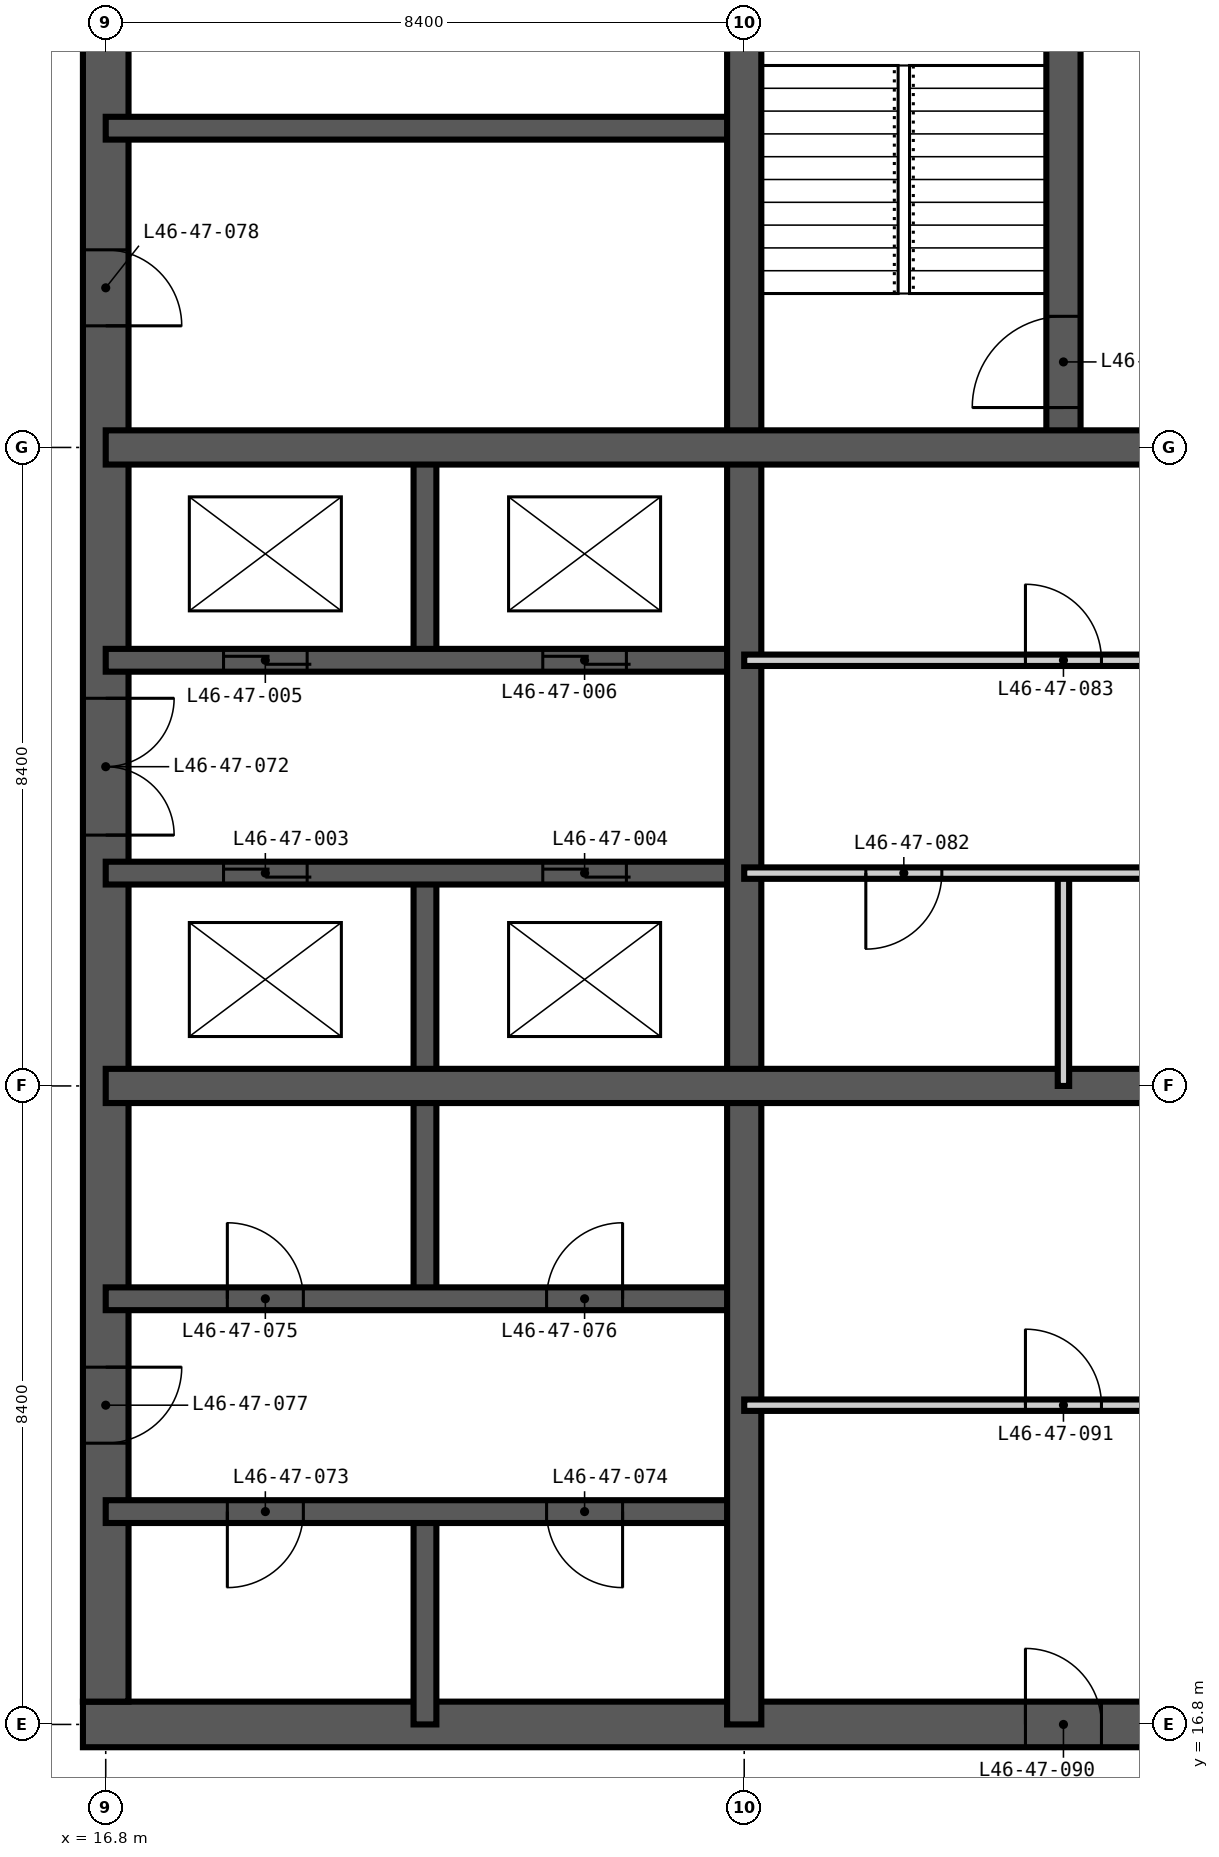
"""IFC4 building model, lengths in metres.
Left out: names, types, materials, properties, quantities, classifications, styles, units other than length and angle.
Written with IfcOpenShell. Run it as: python <this file> out.ifc"""

import sys

from ifc_helpers import new_model, si_unit, direction, frame, frame_2d, origin, place, context, subcontext, project, spatial, rectangle, extrude, element, fill, save


model = new_model("IFC4")
c1 = context("Model", 3, precision=1e-05, world=origin(), true_north=direction((0.0, 1.0)))
c2 = subcontext(c1, "Body", "Model", "MODEL_VIEW")
j1 = project(units=[si_unit("LENGTHUNIT", "METRE"), si_unit("PLANEANGLEUNIT", "RADIAN")], contexts=[c1])
p1 = place(None, origin())
s1 = spatial("IfcSite", under=j1, at=p1, CompositionType="ELEMENT")
p2 = place(p1, origin())
s2 = spatial("IfcBuilding", under=s1, at=p2, CompositionType="ELEMENT")
p3 = place(p2, frame((0.0, 0.0, 180.6)))
s3 = spatial("IfcBuildingStorey", under=s2, at=p3, CompositionType="ELEMENT", Elevation=180.6)
p4 = place(p3, frame((16.5, 16.8, -0.35), z_axis=(0.0, 0.0, 1.0), x_axis=(1.0, 0.0, 0.0)))
e1 = element("IfcWall", 1, at=p4, inside=s3, PredefinedType="SHEAR", context=c2, shape_type="SweptSolid", body=[
    extrude(rectangle(XDim=25.8, YDim=0.6, at=frame_2d((12.9, 0.0))), origin(), (0.0, 0.0, 1.0), 3.6),
])
p5 = place(p4, frame((12.4, 0.0, 0.35)))
e2 = element("IfcOpeningElement", 2, at=p5, cuts=e1, PredefinedType="OPENING", context=c2, shape_type="SweptSolid", body=[
    extrude(rectangle(XDim=1.0, YDim=2.1, at=frame_2d((0.5, 1.05))), frame((0.0, 0.31, 0.0), z_axis=(0.0, -1.0, 0.0), x_axis=(1.0, 0.0, 0.0)), (0.0, 0.0, 1.0), 0.62),
])
p6 = place(p4, frame((18.7, 0.0, 0.35)))
e3 = element("IfcOpeningElement", 3, at=p6, cuts=e1, PredefinedType="OPENING", context=c2, shape_type="SweptSolid", body=[
    extrude(rectangle(XDim=1.0, YDim=2.1, at=frame_2d((0.5, 1.05))), frame((0.0, 0.31, 0.0), z_axis=(0.0, -1.0, 0.0), x_axis=(1.0, 0.0, 0.0)), (0.0, 0.0, 1.0), 0.62),
])
p7 = place(p3, frame((16.8, 41.7, -0.35), z_axis=(0.0, 0.0, 1.0), x_axis=(0.0, -1.0, 0.0)))
e4 = element("IfcWall", 4, at=p7, inside=s3, PredefinedType="SHEAR", context=c2, shape_type="SweptSolid", body=[
    extrude(rectangle(XDim=24.6, YDim=0.6, at=frame_2d((12.3, 0.0))), origin(), (0.0, 0.0, 1.0), 3.6),
])
p8 = place(p7, frame((11.4, 0.0, 0.35)))
e5 = element("IfcOpeningElement", 5, at=p8, cuts=e4, PredefinedType="OPENING", context=c2, shape_type="SweptSolid", body=[
    extrude(rectangle(XDim=1.8, YDim=2.2, at=frame_2d((0.9, 1.1))), frame((0.0, 0.31, 0.0), z_axis=(0.0, -1.0, 0.0), x_axis=(1.0, 0.0, 0.0)), (0.0, 0.0, 1.0), 0.62),
])
p9 = place(p7, frame((20.2, 0.0, 0.35)))
e6 = element("IfcOpeningElement", 6, at=p9, cuts=e4, PredefinedType="OPENING", context=c2, shape_type="SweptSolid", body=[
    extrude(rectangle(XDim=1.0, YDim=2.1, at=frame_2d((0.5, 1.05))), frame((0.0, 0.31, 0.0), z_axis=(0.0, -1.0, 0.0), x_axis=(1.0, 0.0, 0.0)), (0.0, 0.0, 1.0), 0.62),
])
p10 = place(p7, frame((5.5, 0.0, 0.35)))
e7 = element("IfcOpeningElement", 7, at=p10, cuts=e4, PredefinedType="OPENING", context=c2, shape_type="SweptSolid", body=[
    extrude(rectangle(XDim=1.0, YDim=2.1, at=frame_2d((0.5, 1.05))), frame((0.0, 0.31, 0.0), z_axis=(0.0, -1.0, 0.0), x_axis=(1.0, 0.0, 0.0)), (0.0, 0.0, 1.0), 0.62),
])
p11 = place(p3, frame((21.0, 16.8, -0.35), z_axis=(0.0, 0.0, 1.0), x_axis=(0.0, 1.0, 0.0)))
e8 = element("IfcWall", 8, at=p11, inside=s3, PredefinedType="SHEAR", context=c2, shape_type="SweptSolid", body=[
    extrude(rectangle(XDim=2.8, YDim=0.3, at=frame_2d((1.4, 0.0))), origin(), (0.0, 0.0, 1.0), 3.6),
])
p12 = place(p3, frame((21.0, 22.4, -0.35), z_axis=(0.0, 0.0, 1.0), x_axis=(0.0, 1.0, 0.0)))
e9 = element("IfcWall", 9, at=p12, inside=s3, PredefinedType="SHEAR", context=c2, shape_type="SweptSolid", body=[
    extrude(rectangle(XDim=5.6, YDim=0.3, at=frame_2d((2.8, 0.0))), origin(), (0.0, 0.0, 1.0), 3.6),
])
p13 = place(p3, frame((21.0, 30.8, -0.35), z_axis=(0.0, 0.0, 1.0), x_axis=(0.0, 1.0, 0.0)))
e10 = element("IfcWall", 10, at=p13, inside=s3, PredefinedType="SHEAR", context=c2, shape_type="SweptSolid", body=[
    extrude(rectangle(XDim=2.8, YDim=0.3, at=frame_2d((1.4, 0.0))), origin(), (0.0, 0.0, 1.0), 3.6),
])
p14 = place(p3, frame((16.8, 19.6, -0.35), z_axis=(0.0, 0.0, 1.0), x_axis=(1.0, 0.0, 0.0)))
e11 = element("IfcWall", 11, at=p14, inside=s3, PredefinedType="SHEAR", context=c2, shape_type="SweptSolid", body=[
    extrude(rectangle(XDim=8.4, YDim=0.3, at=frame_2d((4.2, 0.0))), origin(), (0.0, 0.0, 1.0), 3.6),
])
p15 = place(p14, frame((1.6, 0.0, 0.35)))
e12 = element("IfcOpeningElement", 12, at=p15, cuts=e11, PredefinedType="OPENING", context=c2, shape_type="SweptSolid", body=[
    extrude(rectangle(XDim=1.0, YDim=2.1, at=frame_2d((0.5, 1.05))), frame((0.0, 0.16, 0.0), z_axis=(0.0, -1.0, 0.0), x_axis=(1.0, 0.0, 0.0)), (0.0, 0.0, 1.0), 0.32),
])
p16 = place(p14, frame((5.8, 0.0, 0.35)))
e13 = element("IfcOpeningElement", 13, at=p16, cuts=e11, PredefinedType="OPENING", context=c2, shape_type="SweptSolid", body=[
    extrude(rectangle(XDim=1.0, YDim=2.1, at=frame_2d((0.5, 1.05))), frame((0.0, 0.16, 0.0), z_axis=(0.0, -1.0, 0.0), x_axis=(1.0, 0.0, 0.0)), (0.0, 0.0, 1.0), 0.32),
])
p17 = place(p3, frame((16.8, 22.4, -0.35), z_axis=(0.0, 0.0, 1.0), x_axis=(1.0, 0.0, 0.0)))
e14 = element("IfcWall", 14, at=p17, inside=s3, PredefinedType="SHEAR", context=c2, shape_type="SweptSolid", body=[
    extrude(rectangle(XDim=8.4, YDim=0.3, at=frame_2d((4.2, 0.0))), origin(), (0.0, 0.0, 1.0), 3.6),
])
p18 = place(p17, frame((1.6, 0.0, 0.35)))
e15 = element("IfcOpeningElement", 15, at=p18, cuts=e14, PredefinedType="OPENING", context=c2, shape_type="SweptSolid", body=[
    extrude(rectangle(XDim=1.0, YDim=2.1, at=frame_2d((0.5, 1.05))), frame((0.0, 0.16, 0.0), z_axis=(0.0, -1.0, 0.0), x_axis=(1.0, 0.0, 0.0)), (0.0, 0.0, 1.0), 0.32),
])
p19 = place(p17, frame((5.8, 0.0, 0.35)))
e16 = element("IfcOpeningElement", 16, at=p19, cuts=e14, PredefinedType="OPENING", context=c2, shape_type="SweptSolid", body=[
    extrude(rectangle(XDim=1.0, YDim=2.1, at=frame_2d((0.5, 1.05))), frame((0.0, 0.16, 0.0), z_axis=(0.0, -1.0, 0.0), x_axis=(1.0, 0.0, 0.0)), (0.0, 0.0, 1.0), 0.32),
])
p20 = place(p3, frame((16.8, 28.0, -0.35), z_axis=(0.0, 0.0, 1.0), x_axis=(1.0, 0.0, 0.0)))
e17 = element("IfcWall", 17, at=p20, inside=s3, PredefinedType="SHEAR", context=c2, shape_type="SweptSolid", body=[
    extrude(rectangle(XDim=8.4, YDim=0.3, at=frame_2d((4.2, 0.0))), origin(), (0.0, 0.0, 1.0), 3.6),
])
p21 = place(p20, frame((1.55, 0.0, 0.35)))
e18 = element("IfcOpeningElement", 18, at=p21, cuts=e17, PredefinedType="OPENING", context=c2, shape_type="SweptSolid", body=[
    extrude(rectangle(XDim=1.1, YDim=2.2, at=frame_2d((0.55, 1.1))), frame((0.0, 0.16, 0.0), z_axis=(0.0, -1.0, 0.0), x_axis=(1.0, 0.0, 0.0)), (0.0, 0.0, 1.0), 0.32),
])
p22 = place(p20, frame((5.75, 0.0, 0.35)))
e19 = element("IfcOpeningElement", 19, at=p22, cuts=e17, PredefinedType="OPENING", context=c2, shape_type="SweptSolid", body=[
    extrude(rectangle(XDim=1.1, YDim=2.2, at=frame_2d((0.55, 1.1))), frame((0.0, 0.16, 0.0), z_axis=(0.0, -1.0, 0.0), x_axis=(1.0, 0.0, 0.0)), (0.0, 0.0, 1.0), 0.32),
])
p23 = place(p3, frame((16.8, 30.8, -0.35), z_axis=(0.0, 0.0, 1.0), x_axis=(1.0, 0.0, 0.0)))
e20 = element("IfcWall", 20, at=p23, inside=s3, PredefinedType="SHEAR", context=c2, shape_type="SweptSolid", body=[
    extrude(rectangle(XDim=8.4, YDim=0.3, at=frame_2d((4.2, 0.0))), origin(), (0.0, 0.0, 1.0), 3.6),
])
p24 = place(p23, frame((1.55, 0.0, 0.35)))
e21 = element("IfcOpeningElement", 21, at=p24, cuts=e20, PredefinedType="OPENING", context=c2, shape_type="SweptSolid", body=[
    extrude(rectangle(XDim=1.1, YDim=2.2, at=frame_2d((0.55, 1.1))), frame((0.0, 0.16, 0.0), z_axis=(0.0, -1.0, 0.0), x_axis=(1.0, 0.0, 0.0)), (0.0, 0.0, 1.0), 0.32),
])
p25 = place(p23, frame((5.75, 0.0, 0.35)))
e22 = element("IfcOpeningElement", 22, at=p25, cuts=e20, PredefinedType="OPENING", context=c2, shape_type="SweptSolid", body=[
    extrude(rectangle(XDim=1.1, YDim=2.2, at=frame_2d((0.55, 1.1))), frame((0.0, 0.16, 0.0), z_axis=(0.0, -1.0, 0.0), x_axis=(1.0, 0.0, 0.0)), (0.0, 0.0, 1.0), 0.32),
])
p26 = place(p3, frame((16.8, 37.8, -0.35), z_axis=(0.0, 0.0, 1.0), x_axis=(1.0, 0.0, 0.0)))
e23 = element("IfcWall", 23, at=p26, inside=s3, PredefinedType="SHEAR", context=c2, shape_type="SweptSolid", body=[
    extrude(rectangle(XDim=8.4, YDim=0.3, at=frame_2d((4.2, 0.0))), origin(), (0.0, 0.0, 1.0), 3.6),
])
p27 = place(p3, frame((25.2, 16.8, -0.35), z_axis=(0.0, 0.0, 1.0), x_axis=(0.0, 1.0, 0.0)))
e24 = element("IfcWall", 24, at=p27, inside=s3, PredefinedType="SHEAR", context=c2, shape_type="SweptSolid", body=[
    extrude(rectangle(XDim=25.2, YDim=0.45, at=frame_2d((12.6, 0.0))), origin(), (0.0, 0.0, 1.0), 3.6),
])
p28 = place(p3, frame((29.4, 33.6, -0.35), z_axis=(0.0, 0.0, 1.0), x_axis=(0.0, 1.0, 0.0)))
e25 = element("IfcWall", 25, at=p28, inside=s3, PredefinedType="SHEAR", context=c2, shape_type="SweptSolid", body=[
    extrude(rectangle(XDim=8.4, YDim=0.45, at=frame_2d((4.2, 0.0))), origin(), (0.0, 0.0, 1.0), 3.6),
])
p29 = place(p28, frame((0.525, 0.0, 0.35)))
e26 = element("IfcOpeningElement", 26, at=p29, cuts=e25, PredefinedType="OPENING", context=c2, shape_type="SweptSolid", body=[
    extrude(rectangle(XDim=1.2, YDim=2.2, at=frame_2d((0.6, 1.1))), frame((0.0, 0.235, 0.0), z_axis=(0.0, -1.0, 0.0), x_axis=(1.0, 0.0, 0.0)), (0.0, 0.0, 1.0), 0.47),
])
for number, where, z_axis, x_axis in (
    (27, (16.8, 25.2, -0.35), (0.0, 0.0, 1.0), (1.0, 0.0, 0.0)),
    (28, (16.8, 33.6, -0.35), (0.0, 0.0, 1.0), (1.0, 0.0, 0.0)),
):
    element("IfcWall", number, at=place(p3, frame(where, z_axis=z_axis, x_axis=x_axis)), inside=s3, PredefinedType="SHEAR", context=c2, shape_type="SweptSolid", body=[
        extrude(rectangle(XDim=25.2, YDim=0.45, at=frame_2d((12.6, 0.0))), origin(), (0.0, 0.0, 1.0), 3.6),
    ])
p30 = place(p3, frame((29.4, 25.2, 0.0), z_axis=(0.0, 0.0, 1.0), x_axis=(0.0, 1.0, 0.0)))
e29 = element("IfcWall", 29, at=p30, inside=s3, PredefinedType="PARTITIONING", context=c2, shape_type="SweptSolid", body=[
    extrude(rectangle(XDim=2.8, YDim=0.15, at=frame_2d((1.4, 0.0))), origin(), (0.0, 0.0, 1.0), 3.25),
])
p31 = place(p3, frame((25.2, 21.0, 0.0), z_axis=(0.0, 0.0, 1.0), x_axis=(1.0, 0.0, 0.0)))
e30 = element("IfcWall", 30, at=p31, inside=s3, PredefinedType="PARTITIONING", context=c2, shape_type="SweptSolid", body=[
    extrude(rectangle(XDim=8.4, YDim=0.15, at=frame_2d((4.2, 0.0))), origin(), (0.0, 0.0, 1.0), 3.25),
])
p32 = place(p31, frame((3.7, 0.0, 0.0)))
e31 = element("IfcOpeningElement", 31, at=p32, cuts=e30, PredefinedType="OPENING", context=c2, shape_type="SweptSolid", body=[
    extrude(rectangle(XDim=1.0, YDim=2.1, at=frame_2d((0.5, 1.05))), frame((0.0, 0.085, 0.0), z_axis=(0.0, -1.0, 0.0), x_axis=(1.0, 0.0, 0.0)), (0.0, 0.0, 1.0), 0.17),
])
p33 = place(p3, frame((25.2, 28.0, 0.0), z_axis=(0.0, 0.0, 1.0), x_axis=(1.0, 0.0, 0.0)))
e32 = element("IfcWall", 32, at=p33, inside=s3, PredefinedType="PARTITIONING", context=c2, shape_type="SweptSolid", body=[
    extrude(rectangle(XDim=8.4, YDim=0.15, at=frame_2d((4.2, 0.0))), origin(), (0.0, 0.0, 1.0), 3.25),
])
p34 = place(p33, frame((5.8, 0.0, 0.0)))
e33 = element("IfcOpeningElement", 33, at=p34, cuts=e32, PredefinedType="OPENING", context=c2, shape_type="SweptSolid", body=[
    extrude(rectangle(XDim=1.0, YDim=2.1, at=frame_2d((0.5, 1.05))), frame((0.0, 0.085, 0.0), z_axis=(0.0, -1.0, 0.0), x_axis=(1.0, 0.0, 0.0)), (0.0, 0.0, 1.0), 0.17),
])
p35 = place(p33, frame((1.6, 0.0, 0.0)))
e34 = element("IfcOpeningElement", 34, at=p35, cuts=e32, PredefinedType="OPENING", context=c2, shape_type="SweptSolid", body=[
    extrude(rectangle(XDim=1.0, YDim=2.1, at=frame_2d((0.5, 1.05))), frame((0.0, 0.085, 0.0), z_axis=(0.0, -1.0, 0.0), x_axis=(1.0, 0.0, 0.0)), (0.0, 0.0, 1.0), 0.17),
])
p36 = place(p3, frame((25.2, 30.8, 0.0), z_axis=(0.0, 0.0, 1.0), x_axis=(1.0, 0.0, 0.0)))
e35 = element("IfcWall", 35, at=p36, inside=s3, PredefinedType="PARTITIONING", context=c2, shape_type="SweptSolid", body=[
    extrude(rectangle(XDim=8.4, YDim=0.15, at=frame_2d((4.2, 0.0))), origin(), (0.0, 0.0, 1.0), 3.25),
])
p37 = place(p36, frame((3.7, 0.0, 0.0)))
e36 = element("IfcOpeningElement", 36, at=p37, cuts=e35, PredefinedType="OPENING", context=c2, shape_type="SweptSolid", body=[
    extrude(rectangle(XDim=1.0, YDim=2.1, at=frame_2d((0.5, 1.05))), frame((0.0, 0.085, 0.0), z_axis=(0.0, -1.0, 0.0), x_axis=(1.0, 0.0, 0.0)), (0.0, 0.0, 1.0), 0.17),
])
p38 = place(p29, origin())
e37 = element("IfcDoor", 37, at=p38, inside=s3, OperationType="SINGLE_SWING_LEFT", PredefinedType="DOOR", context=c2, shape_type="SweptSolid", body=[
    extrude(rectangle(XDim=1.2, YDim=2.2, at=frame_2d((0.6, 1.1))), frame((0.0, 0.025, 0.0), z_axis=(0.0, -1.0, 0.0), x_axis=(1.0, 0.0, 0.0)), (0.0, 0.0, 1.0), 0.05),
])
fill(e26, e37)
p39 = place(p21, origin())
e38 = element("IfcDoor", 38, at=p39, inside=s3, OperationType="DOUBLE_DOOR_SLIDING", PredefinedType="DOOR", context=c2, shape_type="SweptSolid", body=[
    extrude(rectangle(XDim=1.1, YDim=2.2, at=frame_2d((0.55, 1.1))), frame((0.0, 0.025, 0.0), z_axis=(0.0, -1.0, 0.0), x_axis=(1.0, 0.0, 0.0)), (0.0, 0.0, 1.0), 0.05),
])
fill(e18, e38)
p40 = place(p22, origin())
e39 = element("IfcDoor", 39, at=p40, inside=s3, OperationType="DOUBLE_DOOR_SLIDING", PredefinedType="DOOR", context=c2, shape_type="SweptSolid", body=[
    extrude(rectangle(XDim=1.1, YDim=2.2, at=frame_2d((0.55, 1.1))), frame((0.0, 0.025, 0.0), z_axis=(0.0, -1.0, 0.0), x_axis=(1.0, 0.0, 0.0)), (0.0, 0.0, 1.0), 0.05),
])
fill(e19, e39)
p41 = place(p24, origin())
e40 = element("IfcDoor", 40, at=p41, inside=s3, OperationType="DOUBLE_DOOR_SLIDING", PredefinedType="DOOR", context=c2, shape_type="SweptSolid", body=[
    extrude(rectangle(XDim=1.1, YDim=2.2, at=frame_2d((0.55, 1.1))), frame((0.0, 0.025, 0.0), z_axis=(0.0, -1.0, 0.0), x_axis=(1.0, 0.0, 0.0)), (0.0, 0.0, 1.0), 0.05),
])
fill(e21, e40)
p42 = place(p25, origin())
e41 = element("IfcDoor", 41, at=p42, inside=s3, OperationType="DOUBLE_DOOR_SLIDING", PredefinedType="DOOR", context=c2, shape_type="SweptSolid", body=[
    extrude(rectangle(XDim=1.1, YDim=2.2, at=frame_2d((0.55, 1.1))), frame((0.0, 0.025, 0.0), z_axis=(0.0, -1.0, 0.0), x_axis=(1.0, 0.0, 0.0)), (0.0, 0.0, 1.0), 0.05),
])
fill(e22, e41)
p43 = place(p8, origin())
e42 = element("IfcDoor", 42, at=p43, inside=s3, OperationType="DOUBLE_DOOR_DOUBLE_SWING", PredefinedType="DOOR", context=c2, shape_type="SweptSolid", body=[
    extrude(rectangle(XDim=1.8, YDim=2.2, at=frame_2d((0.9, 1.1))), frame((0.0, 0.025, 0.0), z_axis=(0.0, -1.0, 0.0), x_axis=(1.0, 0.0, 0.0)), (0.0, 0.0, 1.0), 0.05),
])
fill(e5, e42)
p44 = place(p15, frame((1.0, 0.0, 0.0), z_axis=(0.0, 0.0, 1.0), x_axis=(-1.0, 0.0, 0.0)))
e43 = element("IfcDoor", 43, at=p44, inside=s3, OperationType="SINGLE_SWING_RIGHT", PredefinedType="DOOR", context=c2, shape_type="SweptSolid", body=[
    extrude(rectangle(XDim=1.0, YDim=2.1, at=frame_2d((0.5, 1.05))), frame((0.0, 0.025, 0.0), z_axis=(0.0, -1.0, 0.0), x_axis=(1.0, 0.0, 0.0)), (0.0, 0.0, 1.0), 0.05),
])
fill(e12, e43)
p45 = place(p16, frame((1.0, 0.0, 0.0), z_axis=(0.0, 0.0, 1.0), x_axis=(-1.0, 0.0, 0.0)))
e44 = element("IfcDoor", 44, at=p45, inside=s3, OperationType="SINGLE_SWING_LEFT", PredefinedType="DOOR", context=c2, shape_type="SweptSolid", body=[
    extrude(rectangle(XDim=1.0, YDim=2.1, at=frame_2d((0.5, 1.05))), frame((0.0, 0.025, 0.0), z_axis=(0.0, -1.0, 0.0), x_axis=(1.0, 0.0, 0.0)), (0.0, 0.0, 1.0), 0.05),
])
fill(e13, e44)
p46 = place(p18, origin())
e45 = element("IfcDoor", 45, at=p46, inside=s3, OperationType="SINGLE_SWING_LEFT", PredefinedType="DOOR", context=c2, shape_type="SweptSolid", body=[
    extrude(rectangle(XDim=1.0, YDim=2.1, at=frame_2d((0.5, 1.05))), frame((0.0, 0.025, 0.0), z_axis=(0.0, -1.0, 0.0), x_axis=(1.0, 0.0, 0.0)), (0.0, 0.0, 1.0), 0.05),
])
fill(e15, e45)
p47 = place(p19, origin())
e46 = element("IfcDoor", 46, at=p47, inside=s3, OperationType="SINGLE_SWING_RIGHT", PredefinedType="DOOR", context=c2, shape_type="SweptSolid", body=[
    extrude(rectangle(XDim=1.0, YDim=2.1, at=frame_2d((0.5, 1.05))), frame((0.0, 0.025, 0.0), z_axis=(0.0, -1.0, 0.0), x_axis=(1.0, 0.0, 0.0)), (0.0, 0.0, 1.0), 0.05),
])
fill(e16, e46)
p48 = place(p9, origin())
e47 = element("IfcDoor", 47, at=p48, inside=s3, OperationType="SINGLE_SWING_LEFT", PredefinedType="DOOR", context=c2, shape_type="SweptSolid", body=[
    extrude(rectangle(XDim=1.0, YDim=2.1, at=frame_2d((0.5, 1.05))), frame((0.0, 0.025, 0.0), z_axis=(0.0, -1.0, 0.0), x_axis=(1.0, 0.0, 0.0)), (0.0, 0.0, 1.0), 0.05),
])
fill(e6, e47)
p49 = place(p10, origin())
e48 = element("IfcDoor", 48, at=p49, inside=s3, OperationType="SINGLE_SWING_RIGHT", PredefinedType="DOOR", context=c2, shape_type="SweptSolid", body=[
    extrude(rectangle(XDim=1.0, YDim=2.1, at=frame_2d((0.5, 1.05))), frame((0.0, 0.025, 0.0), z_axis=(0.0, -1.0, 0.0), x_axis=(1.0, 0.0, 0.0)), (0.0, 0.0, 1.0), 0.05),
])
fill(e7, e48)
p50 = place(p35, frame((1.0, 0.0, 0.0), z_axis=(0.0, 0.0, 1.0), x_axis=(-1.0, 0.0, 0.0)))
e49 = element("IfcDoor", 49, at=p50, inside=s3, OperationType="SINGLE_SWING_RIGHT", PredefinedType="DOOR", context=c2, shape_type="SweptSolid", body=[
    extrude(rectangle(XDim=1.0, YDim=2.1, at=frame_2d((0.5, 1.05))), frame((0.0, 0.025, 0.0), z_axis=(0.0, -1.0, 0.0), x_axis=(1.0, 0.0, 0.0)), (0.0, 0.0, 1.0), 0.05),
])
fill(e34, e49)
p51 = place(p37, origin())
e50 = element("IfcDoor", 50, at=p51, inside=s3, OperationType="SINGLE_SWING_LEFT", PredefinedType="DOOR", context=c2, shape_type="SweptSolid", body=[
    extrude(rectangle(XDim=1.0, YDim=2.1, at=frame_2d((0.5, 1.05))), frame((0.0, 0.025, 0.0), z_axis=(0.0, -1.0, 0.0), x_axis=(1.0, 0.0, 0.0)), (0.0, 0.0, 1.0), 0.05),
])
fill(e36, e50)
p52 = place(p5, origin())
e51 = element("IfcDoor", 51, at=p52, inside=s3, OperationType="SINGLE_SWING_LEFT", PredefinedType="DOOR", context=c2, shape_type="SweptSolid", body=[
    extrude(rectangle(XDim=1.0, YDim=2.1, at=frame_2d((0.5, 1.05))), frame((0.0, 0.025, 0.0), z_axis=(0.0, -1.0, 0.0), x_axis=(1.0, 0.0, 0.0)), (0.0, 0.0, 1.0), 0.05),
])
fill(e2, e51)
p53 = place(p32, origin())
e52 = element("IfcDoor", 52, at=p53, inside=s3, OperationType="SINGLE_SWING_LEFT", PredefinedType="DOOR", context=c2, shape_type="SweptSolid", body=[
    extrude(rectangle(XDim=1.0, YDim=2.1, at=frame_2d((0.5, 1.05))), frame((0.0, 0.025, 0.0), z_axis=(0.0, -1.0, 0.0), x_axis=(1.0, 0.0, 0.0)), (0.0, 0.0, 1.0), 0.05),
])
fill(e31, e52)
save(model, sys.argv[1])
